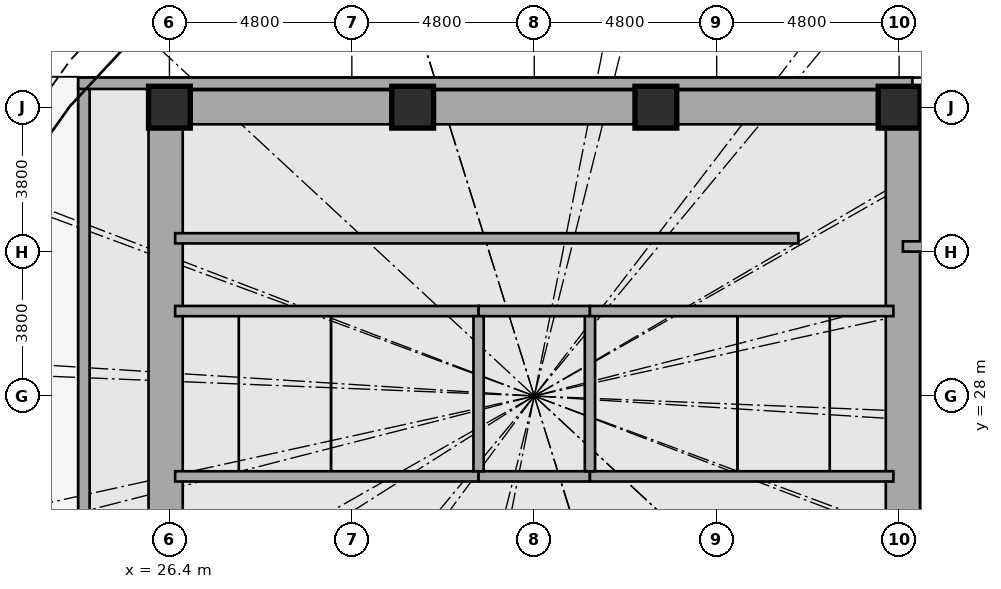
"""IFC4 building model, lengths in metres.
Left out: names, types, materials, properties, quantities, classifications, styles, units other than length and angle.
Written with IfcOpenShell. Run it as: python <this file> out.ifc"""

import sys

from ifc_helpers import new_model, si_unit, direction, frame, frame_2d, origin, origin_2d, place, context, subcontext, project, spatial, rectangle, extrude, element, fill, save


model = new_model("IFC4")
c1 = context("Model", 3, precision=1e-05, world=origin(), true_north=direction((0.0, 1.0)))
c2 = subcontext(c1, "Body", "Model", "MODEL_VIEW")
j1 = project(units=[si_unit("LENGTHUNIT", "METRE"), si_unit("PLANEANGLEUNIT", "RADIAN")], contexts=[c1])
p1 = place(None, origin())
s1 = spatial("IfcSite", under=j1, at=p1, CompositionType="ELEMENT")
p2 = place(p1, origin())
s2 = spatial("IfcBuilding", under=s1, at=p2, CompositionType="ELEMENT")
p3 = place(p2, origin())
s3 = spatial("IfcBuildingStorey", under=s2, at=p3, CompositionType="ELEMENT", Elevation=0.0)
for number, where, z_axis, x_axis in (
    (1, (45.6, 35.6, 0.0), (0.0, 0.0, 1.0), (1.0, 0.0, 0.0)),
    (2, (39.2, 35.6, 0.0), (0.0, 0.0, 1.0), (1.0, 0.0, 0.0)),
    (3, (32.8, 35.6, 0.0), (0.0, 0.0, 1.0), (1.0, 0.0, 0.0)),
    (4, (26.4, 35.6, 0.0), (0.0, 0.0, 1.0), (1.0, 0.0, 0.0)),
):
    element("IfcColumn", number, at=place(p3, frame(where, z_axis=z_axis, x_axis=x_axis)), inside=s3, PredefinedType="COLUMN", context=c2, shape_type="SweptSolid", body=[
        extrude(rectangle(XDim=1.1, YDim=1.1, at=origin_2d()), origin(), (0.0, 0.0, 1.0), 6.0),
    ])
p4 = place(p3, frame((26.3, 20.95, 0.0), z_axis=(0.0, 0.0, 1.0), x_axis=(0.0, 1.0, 0.0)))
e5 = element("IfcWall", 5, at=p4, inside=s3, PredefinedType="SHEAR", context=c2, shape_type="SweptSolid", body=[
    extrude(rectangle(XDim=14.1, YDim=0.9, at=frame_2d((7.05, 0.0))), origin(), (0.0, 0.0, 1.0), 6.0),
])
p5 = place(p4, frame((6.5, 0.0, 0.0)))
e6 = element("IfcOpeningElement", 6, at=p5, cuts=e5, PredefinedType="OPENING", context=c2, shape_type="SweptSolid", body=[
    extrude(rectangle(XDim=1.2, YDim=2.15, at=frame_2d((0.6, 1.075))), frame((0.0, 0.46, 0.0), z_axis=(0.0, -1.0, 0.0), x_axis=(1.0, 0.0, 0.0)), (0.0, 0.0, 1.0), 0.92),
])
p6 = place(p4, frame((9.6, 0.0, 0.0)))
e7 = element("IfcOpeningElement", 7, at=p6, cuts=e5, PredefinedType="OPENING", context=c2, shape_type="SweptSolid", body=[
    extrude(rectangle(XDim=1.3, YDim=2.2, at=frame_2d((0.65, 1.1))), frame((0.0, 0.46, 0.0), z_axis=(0.0, -1.0, 0.0), x_axis=(1.0, 0.0, 0.0)), (0.0, 0.0, 1.0), 0.92),
])
p7 = place(p4, frame((3.26, 0.0, 0.0)))
e8 = element("IfcOpeningElement", 8, at=p7, cuts=e5, PredefinedType="OPENING", context=c2, shape_type="SweptSolid", body=[
    extrude(rectangle(XDim=1.3, YDim=2.2, at=frame_2d((0.65, 1.1))), frame((0.0, 0.46, 0.0), z_axis=(0.0, -1.0, 0.0), x_axis=(1.0, 0.0, 0.0)), (0.0, 0.0, 1.0), 0.92),
])
p8 = place(p3, frame((45.7, 20.95, 0.0), z_axis=(0.0, 0.0, 1.0), x_axis=(0.0, 1.0, 0.0)))
e9 = element("IfcWall", 9, at=p8, inside=s3, PredefinedType="SHEAR", context=c2, shape_type="SweptSolid", body=[
    extrude(rectangle(XDim=14.1, YDim=0.9, at=frame_2d((7.05, 0.0))), origin(), (0.0, 0.0, 1.0), 6.0),
])
p9 = place(p8, frame((11.75, 0.0, 0.0)))
e10 = element("IfcOpeningElement", 10, at=p9, cuts=e9, PredefinedType="OPENING", context=c2, shape_type="SweptSolid", body=[
    extrude(rectangle(XDim=1.4, YDim=2.3, at=frame_2d((0.7, 1.15))), frame((0.0, 0.46, 0.0), z_axis=(0.0, -1.0, 0.0), x_axis=(1.0, 0.0, 0.0)), (0.0, 0.0, 1.0), 0.92),
])
p10 = place(p8, frame((0.95, 0.0, 0.0)))
e11 = element("IfcOpeningElement", 11, at=p10, cuts=e9, PredefinedType="OPENING", context=c2, shape_type="SweptSolid", body=[
    extrude(rectangle(XDim=1.4, YDim=2.3, at=frame_2d((0.7, 1.15))), frame((0.0, 0.46, 0.0), z_axis=(0.0, -1.0, 0.0), x_axis=(1.0, 0.0, 0.0)), (0.0, 0.0, 1.0), 0.92),
])
p11 = place(p3, frame((26.95, 35.6, 0.0), z_axis=(0.0, 0.0, 1.0), x_axis=(1.0, 0.0, 0.0)))
e12 = element("IfcWall", 12, at=p11, inside=s3, PredefinedType="SHEAR", context=c2, shape_type="SweptSolid", body=[
    extrude(rectangle(XDim=5.3, YDim=0.9, at=frame_2d((2.65, 0.0))), origin(), (0.0, 0.0, 1.0), 6.0),
])
p12 = place(p3, frame((33.35, 35.6, 0.0), z_axis=(0.0, 0.0, 1.0), x_axis=(1.0, 0.0, 0.0)))
e13 = element("IfcWall", 13, at=p12, inside=s3, PredefinedType="SHEAR", context=c2, shape_type="SweptSolid", body=[
    extrude(rectangle(XDim=5.3, YDim=0.9, at=frame_2d((2.65, 0.0))), origin(), (0.0, 0.0, 1.0), 6.0),
])
p13 = place(p3, frame((39.75, 35.6, 0.0), z_axis=(0.0, 0.0, 1.0), x_axis=(1.0, 0.0, 0.0)))
e14 = element("IfcWall", 14, at=p13, inside=s3, PredefinedType="SHEAR", context=c2, shape_type="SweptSolid", body=[
    extrude(rectangle(XDim=5.3, YDim=0.9, at=frame_2d((2.65, 0.0))), origin(), (0.0, 0.0, 1.0), 6.0),
])
p14 = place(p3, frame((24.15, 13.75, 0.0), z_axis=(0.0, 0.0, 1.0), x_axis=(0.0, 1.0, 0.0)))
e15 = element("IfcWall", 15, at=p14, inside=s3, PredefinedType="SOLIDWALL", context=c2, shape_type="SweptSolid", body=[
    extrude(rectangle(XDim=22.48, YDim=0.3, at=frame_2d((11.24, 0.0))), origin(), (0.0, 0.0, 1.0), 5.72),
])
p15 = place(p14, frame((8.15, 0.0, 0.0)))
e16 = element("IfcOpeningElement", 16, at=p15, cuts=e15, PredefinedType="OPENING", context=c2, shape_type="SweptSolid", body=[
    extrude(rectangle(XDim=1.8, YDim=2.4, at=frame_2d((0.9, 1.2))), frame((0.0, 0.16, 0.0), z_axis=(0.0, -1.0, 0.0), x_axis=(1.0, 0.0, 0.0)), (0.0, 0.0, 1.0), 0.32),
])
p16 = place(p14, frame((13.4, 0.0, 0.0)))
e17 = element("IfcOpeningElement", 17, at=p16, cuts=e15, PredefinedType="OPENING", context=c2, shape_type="SweptSolid", body=[
    extrude(rectangle(XDim=1.8, YDim=2.4, at=frame_2d((0.9, 1.2))), frame((0.0, 0.16, 0.0), z_axis=(0.0, -1.0, 0.0), x_axis=(1.0, 0.0, 0.0)), (0.0, 0.0, 1.0), 0.32),
])
p17 = place(p14, frame((18.45, 0.0, 0.0)))
e18 = element("IfcOpeningElement", 18, at=p17, cuts=e15, PredefinedType="OPENING", context=c2, shape_type="SweptSolid", body=[
    extrude(rectangle(XDim=1.8, YDim=2.4, at=frame_2d((0.9, 1.2))), frame((0.0, 0.16, 0.0), z_axis=(0.0, -1.0, 0.0), x_axis=(1.0, 0.0, 0.0)), (0.0, 0.0, 1.0), 0.32),
])
p18 = place(p3, frame((24.0, 36.23, 0.0), z_axis=(0.0, 0.0, 1.0), x_axis=(1.0, 0.0, 0.0)))
e19 = element("IfcWall", 19, at=p18, inside=s3, PredefinedType="SOLIDWALL", context=c2, shape_type="SweptSolid", body=[
    extrude(rectangle(XDim=21.95, YDim=0.3, at=frame_2d((10.975, 0.0))), origin(), (0.0, 0.0, 1.0), 5.72),
])
p19 = place(p18, frame((4.45, 0.0, 0.9)))
e20 = element("IfcOpeningElement", 20, at=p19, cuts=e19, PredefinedType="OPENING", context=c2, shape_type="SweptSolid", body=[
    extrude(rectangle(XDim=2.4, YDim=3.0, at=frame_2d((1.2, 1.5))), frame((0.0, 0.16, 0.0), z_axis=(0.0, -1.0, 0.0), x_axis=(1.0, 0.0, 0.0)), (0.0, 0.0, 1.0), 0.32),
])
p20 = place(p18, frame((10.85, 0.0, 0.9)))
e21 = element("IfcOpeningElement", 21, at=p20, cuts=e19, PredefinedType="OPENING", context=c2, shape_type="SweptSolid", body=[
    extrude(rectangle(XDim=2.4, YDim=3.0, at=frame_2d((1.2, 1.5))), frame((0.0, 0.16, 0.0), z_axis=(0.0, -1.0, 0.0), x_axis=(1.0, 0.0, 0.0)), (0.0, 0.0, 1.0), 0.32),
])
p21 = place(p18, frame((17.25, 0.0, 0.9)))
e22 = element("IfcOpeningElement", 22, at=p21, cuts=e19, PredefinedType="OPENING", context=c2, shape_type="SweptSolid", body=[
    extrude(rectangle(XDim=2.4, YDim=3.0, at=frame_2d((1.2, 1.5))), frame((0.0, 0.16, 0.0), z_axis=(0.0, -1.0, 0.0), x_axis=(1.0, 0.0, 0.0)), (0.0, 0.0, 1.0), 0.32),
])
p22 = place(p3, frame((26.55, 30.235, 0.0), z_axis=(0.0, 0.0, 1.0), x_axis=(1.0, 0.0, 0.0)))
e23 = element("IfcWall", 23, at=p22, inside=s3, PredefinedType="SHEAR", context=c2, shape_type="SweptSolid", body=[
    extrude(rectangle(XDim=7.985, YDim=0.27, at=frame_2d((3.992, 0.0))), origin(), (0.0, 0.0, 1.0), 6.0),
])
p23 = place(p3, frame((34.535, 30.235, 0.0), z_axis=(0.0, 0.0, 1.0), x_axis=(1.0, 0.0, 0.0)))
e24 = element("IfcWall", 24, at=p23, inside=s3, PredefinedType="SHEAR", context=c2, shape_type="SweptSolid", body=[
    extrude(rectangle(XDim=2.93, YDim=0.27, at=frame_2d((1.465, 0.0))), origin(), (0.0, 0.0, 1.0), 6.0),
])
p24 = place(p23, frame((0.965, 0.0, 0.0)))
e25 = element("IfcOpeningElement", 25, at=p24, cuts=e24, PredefinedType="OPENING", context=c2, shape_type="SweptSolid", body=[
    extrude(rectangle(XDim=1.0, YDim=2.1, at=frame_2d((0.5, 1.05))), frame((0.0, 0.145, 0.0), z_axis=(0.0, -1.0, 0.0), x_axis=(1.0, 0.0, 0.0)), (0.0, 0.0, 1.0), 0.29),
])
p25 = place(p3, frame((37.465, 30.235, 0.0), z_axis=(0.0, 0.0, 1.0), x_axis=(1.0, 0.0, 0.0)))
e26 = element("IfcWall", 26, at=p25, inside=s3, PredefinedType="SHEAR", context=c2, shape_type="SweptSolid", body=[
    extrude(rectangle(XDim=7.985, YDim=0.27, at=frame_2d((3.992, 0.0))), origin(), (0.0, 0.0, 1.0), 6.0),
])
p26 = place(p25, frame((6.455, 0.0, 0.0)))
e27 = element("IfcOpeningElement", 27, at=p26, cuts=e26, PredefinedType="OPENING", context=c2, shape_type="SweptSolid", body=[
    extrude(rectangle(XDim=1.2, YDim=2.15, at=frame_2d((0.6, 1.075))), frame((0.0, 0.145, 0.0), z_axis=(0.0, -1.0, 0.0), x_axis=(1.0, 0.0, 0.0)), (0.0, 0.0, 1.0), 0.29),
])
p27 = place(p3, frame((26.55, 25.885, 0.0), z_axis=(0.0, 0.0, 1.0), x_axis=(1.0, 0.0, 0.0)))
e28 = element("IfcWall", 28, at=p27, inside=s3, PredefinedType="SHEAR", context=c2, shape_type="SweptSolid", body=[
    extrude(rectangle(XDim=7.985, YDim=0.27, at=frame_2d((3.992, 0.0))), origin(), (0.0, 0.0, 1.0), 6.0),
])
p28 = place(p3, frame((34.535, 25.885, 0.0), z_axis=(0.0, 0.0, 1.0), x_axis=(1.0, 0.0, 0.0)))
e29 = element("IfcWall", 29, at=p28, inside=s3, PredefinedType="SHEAR", context=c2, shape_type="SweptSolid", body=[
    extrude(rectangle(XDim=2.93, YDim=0.27, at=frame_2d((1.465, 0.0))), origin(), (0.0, 0.0, 1.0), 6.0),
])
p29 = place(p3, frame((37.465, 25.885, 0.0), z_axis=(0.0, 0.0, 1.0), x_axis=(1.0, 0.0, 0.0)))
e30 = element("IfcWall", 30, at=p29, inside=s3, PredefinedType="SHEAR", context=c2, shape_type="SweptSolid", body=[
    extrude(rectangle(XDim=7.985, YDim=0.27, at=frame_2d((3.992, 0.0))), origin(), (0.0, 0.0, 1.0), 6.0),
])
for number, where, z_axis, x_axis in (
    (31, (34.535, 26.02, 0.0), (0.0, 0.0, 1.0), (0.0, 1.0, 0.0)),
    (32, (37.465, 26.02, 0.0), (0.0, 0.0, 1.0), (0.0, 1.0, 0.0)),
):
    element("IfcWall", number, at=place(p3, frame(where, z_axis=z_axis, x_axis=x_axis)), inside=s3, PredefinedType="SHEAR", context=c2, shape_type="SweptSolid", body=[
        extrude(rectangle(XDim=4.08, YDim=0.27, at=frame_2d((2.04, 0.0))), origin(), (0.0, 0.0, 1.0), 6.0),
    ])
p30 = place(p3, frame((26.55, 32.15, 0.0), z_axis=(0.0, 0.0, 1.0), x_axis=(1.0, 0.0, 0.0)))
e33 = element("IfcWall", 33, at=p30, inside=s3, PredefinedType="SHEAR", context=c2, shape_type="SweptSolid", body=[
    extrude(rectangle(XDim=16.4, YDim=0.27, at=frame_2d((8.2, 0.0))), origin(), (0.0, 0.0, 1.0), 6.0),
])
p31 = place(p30, frame((1.1, 0.0, 0.0)))
e34 = element("IfcOpeningElement", 34, at=p31, cuts=e33, PredefinedType="OPENING", context=c2, shape_type="SweptSolid", body=[
    extrude(rectangle(XDim=1.1, YDim=2.2, at=frame_2d((0.55, 1.1))), frame((0.0, 0.145, 0.0), z_axis=(0.0, -1.0, 0.0), x_axis=(1.0, 0.0, 0.0)), (0.0, 0.0, 1.0), 0.29),
])
p32 = place(p30, frame((3.7, 0.0, 0.0)))
e35 = element("IfcOpeningElement", 35, at=p32, cuts=e33, PredefinedType="OPENING", context=c2, shape_type="SweptSolid", body=[
    extrude(rectangle(XDim=1.1, YDim=2.2, at=frame_2d((0.55, 1.1))), frame((0.0, 0.145, 0.0), z_axis=(0.0, -1.0, 0.0), x_axis=(1.0, 0.0, 0.0)), (0.0, 0.0, 1.0), 0.29),
])
p33 = place(p30, frame((6.5, 0.0, 0.0)))
e36 = element("IfcOpeningElement", 36, at=p33, cuts=e33, PredefinedType="OPENING", context=c2, shape_type="SweptSolid", body=[
    extrude(rectangle(XDim=1.1, YDim=2.2, at=frame_2d((0.55, 1.1))), frame((0.0, 0.145, 0.0), z_axis=(0.0, -1.0, 0.0), x_axis=(1.0, 0.0, 0.0)), (0.0, 0.0, 1.0), 0.29),
])
p34 = place(p30, frame((9.1, 0.0, 0.0)))
e37 = element("IfcOpeningElement", 37, at=p34, cuts=e33, PredefinedType="OPENING", context=c2, shape_type="SweptSolid", body=[
    extrude(rectangle(XDim=1.1, YDim=2.2, at=frame_2d((0.55, 1.1))), frame((0.0, 0.145, 0.0), z_axis=(0.0, -1.0, 0.0), x_axis=(1.0, 0.0, 0.0)), (0.0, 0.0, 1.0), 0.29),
])
p35 = place(p30, frame((11.9, 0.0, 0.0)))
e38 = element("IfcOpeningElement", 38, at=p35, cuts=e33, PredefinedType="OPENING", context=c2, shape_type="SweptSolid", body=[
    extrude(rectangle(XDim=1.1, YDim=2.2, at=frame_2d((0.55, 1.1))), frame((0.0, 0.145, 0.0), z_axis=(0.0, -1.0, 0.0), x_axis=(1.0, 0.0, 0.0)), (0.0, 0.0, 1.0), 0.29),
])
p36 = place(p30, frame((14.5, 0.0, 0.0)))
e39 = element("IfcOpeningElement", 39, at=p36, cuts=e33, PredefinedType="OPENING", context=c2, shape_type="SweptSolid", body=[
    extrude(rectangle(XDim=1.1, YDim=2.2, at=frame_2d((0.55, 1.1))), frame((0.0, 0.145, 0.0), z_axis=(0.0, -1.0, 0.0), x_axis=(1.0, 0.0, 0.0)), (0.0, 0.0, 1.0), 0.29),
])
p37 = place(p3, frame((42.95, 31.92, 0.0), z_axis=(0.0, 0.0, 1.0), x_axis=(0.0, 1.0, 0.0)))
e40 = element("IfcWall", 40, at=p37, inside=s3, PredefinedType="SOLIDWALL", context=c2, shape_type="SweptSolid", body=[
    extrude(rectangle(XDim=3.18, YDim=0.25, at=frame_2d((1.59, 0.0))), origin(), (0.0, 0.0, 1.0), 5.72),
])
p38 = place(p3, frame((42.95, 31.92, 0.0), z_axis=(0.0, 0.0, 1.0), x_axis=(1.0, 0.0, 0.0)))
e41 = element("IfcWall", 41, at=p38, inside=s3, PredefinedType="SOLIDWALL", context=c2, shape_type="SweptSolid", body=[
    extrude(rectangle(XDim=2.3, YDim=0.25, at=frame_2d((1.15, 0.0))), origin(), (0.0, 0.0, 1.0), 5.72),
])
for number, where, z_axis, x_axis in (
    (42, (29.5, 32.42, 0.0), (0.0, 0.0, 1.0), (0.0, 1.0, 0.0)),
    (43, (32.2, 32.42, 0.0), (0.0, 0.0, 1.0), (0.0, 1.0, 0.0)),
    (44, (34.9, 32.42, 0.0), (0.0, 0.0, 1.0), (0.0, 1.0, 0.0)),
    (45, (37.6, 32.42, 0.0), (0.0, 0.0, 1.0), (0.0, 1.0, 0.0)),
    (46, (40.3, 32.42, 0.0), (0.0, 0.0, 1.0), (0.0, 1.0, 0.0)),
):
    element("IfcWall", number, at=place(p3, frame(where, z_axis=z_axis, x_axis=x_axis)), inside=s3, PredefinedType="SOLIDWALL", context=c2, shape_type="SweptSolid", body=[
        extrude(rectangle(XDim=2.68, YDim=0.25, at=frame_2d((1.34, 0.0))), origin(), (0.0, 0.0, 1.0), 5.72),
    ])
p39 = place(p3, frame((46.15, 35.98, 0.0), z_axis=(0.0, 0.0, 1.0), x_axis=(1.0, 0.0, 0.0)))
e47 = element("IfcWall", 47, at=p39, inside=s3, PredefinedType="SHEAR", context=c2, shape_type="SweptSolid", body=[
    extrude(rectangle(XDim=4.4, YDim=0.27, at=frame_2d((2.2, 0.0))), origin(), (0.0, 0.0, 1.0), 6.0),
])
p40 = place(p3, frame((45.7, 31.935, 0.0), z_axis=(0.0, 0.0, 1.0), x_axis=(1.0, 0.0, 0.0)))
e48 = element("IfcWall", 48, at=p40, inside=s3, PredefinedType="SHEAR", context=c2, shape_type="SweptSolid", body=[
    extrude(rectangle(XDim=4.715, YDim=0.27, at=frame_2d((2.357, 0.0))), origin(), (0.0, 0.0, 1.0), 6.0),
])
for number, where, z_axis, x_axis in (
    (49, (24.15, 30.225, 0.0), (0.0, 0.0, 1.0), (1.0, 0.0, 0.0)),
    (50, (24.15, 25.895, 0.0), (0.0, 0.0, 1.0), (1.0, 0.0, 0.0)),
):
    element("IfcWall", number, at=place(p3, frame(where, z_axis=z_axis, x_axis=x_axis)), inside=s3, PredefinedType="SOLIDWALL", context=c2, shape_type="SweptSolid", body=[
        extrude(rectangle(XDim=2.15, YDim=0.25, at=frame_2d((1.075, 0.0))), origin(), (0.0, 0.0, 1.0), 5.72),
    ])
p41 = place(p16, origin())
e51 = element("IfcDoor", 51, at=p41, inside=s3, OperationType="DOUBLE_DOOR_SINGLE_SWING", PredefinedType="DOOR", context=c2, shape_type="SweptSolid", body=[
    extrude(rectangle(XDim=1.8, YDim=2.4, at=frame_2d((0.9, 1.2))), frame((0.0, 0.025, 0.0), z_axis=(0.0, -1.0, 0.0), x_axis=(1.0, 0.0, 0.0)), (0.0, 0.0, 1.0), 0.05),
])
fill(e17, e51)
p42 = place(p17, origin())
e52 = element("IfcDoor", 52, at=p42, inside=s3, OperationType="DOUBLE_DOOR_SINGLE_SWING", PredefinedType="DOOR", context=c2, shape_type="SweptSolid", body=[
    extrude(rectangle(XDim=1.8, YDim=2.4, at=frame_2d((0.9, 1.2))), frame((0.0, 0.025, 0.0), z_axis=(0.0, -1.0, 0.0), x_axis=(1.0, 0.0, 0.0)), (0.0, 0.0, 1.0), 0.05),
])
fill(e18, e52)
p43 = place(p19, origin())
e53 = element("IfcWindow", 53, at=p43, inside=s3, PartitioningType="SINGLE_PANEL", PredefinedType="WINDOW", context=c2, shape_type="SweptSolid", body=[
    extrude(rectangle(XDim=2.4, YDim=3.0, at=frame_2d((1.2, 1.5))), frame((0.0, 0.03, 0.0), z_axis=(0.0, -1.0, 0.0), x_axis=(1.0, 0.0, 0.0)), (0.0, 0.0, 1.0), 0.06),
])
fill(e20, e53)
p44 = place(p20, origin())
e54 = element("IfcWindow", 54, at=p44, inside=s3, PartitioningType="SINGLE_PANEL", PredefinedType="WINDOW", context=c2, shape_type="SweptSolid", body=[
    extrude(rectangle(XDim=2.4, YDim=3.0, at=frame_2d((1.2, 1.5))), frame((0.0, 0.03, 0.0), z_axis=(0.0, -1.0, 0.0), x_axis=(1.0, 0.0, 0.0)), (0.0, 0.0, 1.0), 0.06),
])
fill(e21, e54)
p45 = place(p21, origin())
e55 = element("IfcWindow", 55, at=p45, inside=s3, PartitioningType="SINGLE_PANEL", PredefinedType="WINDOW", context=c2, shape_type="SweptSolid", body=[
    extrude(rectangle(XDim=2.4, YDim=3.0, at=frame_2d((1.2, 1.5))), frame((0.0, 0.03, 0.0), z_axis=(0.0, -1.0, 0.0), x_axis=(1.0, 0.0, 0.0)), (0.0, 0.0, 1.0), 0.06),
])
fill(e22, e55)
p46 = place(p5, origin())
e56 = element("IfcDoor", 56, at=p46, inside=s3, OperationType="SINGLE_SWING_LEFT", PredefinedType="DOOR", context=c2, shape_type="SweptSolid", body=[
    extrude(rectangle(XDim=1.2, YDim=2.15, at=frame_2d((0.6, 1.075))), frame((0.0, 0.025, 0.0), z_axis=(0.0, -1.0, 0.0), x_axis=(1.0, 0.0, 0.0)), (0.0, 0.0, 1.0), 0.05),
])
fill(e6, e56)
p47 = place(p26, origin())
e57 = element("IfcDoor", 57, at=p47, inside=s3, OperationType="SINGLE_SWING_RIGHT", PredefinedType="DOOR", context=c2, shape_type="SweptSolid", body=[
    extrude(rectangle(XDim=1.2, YDim=2.15, at=frame_2d((0.6, 1.075))), frame((0.0, 0.025, 0.0), z_axis=(0.0, -1.0, 0.0), x_axis=(1.0, 0.0, 0.0)), (0.0, 0.0, 1.0), 0.05),
])
fill(e27, e57)
p48 = place(p24, origin())
e58 = element("IfcDoor", 58, at=p48, inside=s3, OperationType="SINGLE_SWING_RIGHT", PredefinedType="DOOR", context=c2, shape_type="SweptSolid", body=[
    extrude(rectangle(XDim=1.0, YDim=2.1, at=frame_2d((0.5, 1.05))), frame((0.0, 0.025, 0.0), z_axis=(0.0, -1.0, 0.0), x_axis=(1.0, 0.0, 0.0)), (0.0, 0.0, 1.0), 0.05),
])
fill(e25, e58)
p49 = place(p6, origin())
e59 = element("IfcDoor", 59, at=p49, inside=s3, OperationType="SINGLE_SWING_LEFT", PredefinedType="DOOR", context=c2, shape_type="SweptSolid", body=[
    extrude(rectangle(XDim=1.3, YDim=2.2, at=frame_2d((0.65, 1.1))), frame((0.0, 0.025, 0.0), z_axis=(0.0, -1.0, 0.0), x_axis=(1.0, 0.0, 0.0)), (0.0, 0.0, 1.0), 0.05),
])
fill(e7, e59)
p50 = place(p7, origin())
e60 = element("IfcDoor", 60, at=p50, inside=s3, OperationType="SINGLE_SWING_RIGHT", PredefinedType="DOOR", context=c2, shape_type="SweptSolid", body=[
    extrude(rectangle(XDim=1.3, YDim=2.2, at=frame_2d((0.65, 1.1))), frame((0.0, 0.025, 0.0), z_axis=(0.0, -1.0, 0.0), x_axis=(1.0, 0.0, 0.0)), (0.0, 0.0, 1.0), 0.05),
])
fill(e8, e60)
p51 = place(p31, origin())
e61 = element("IfcDoor", 61, at=p51, inside=s3, OperationType="SLIDING_TO_LEFT", PredefinedType="DOOR", context=c2, shape_type="SweptSolid", body=[
    extrude(rectangle(XDim=1.1, YDim=2.2, at=frame_2d((0.55, 1.1))), frame((0.0, 0.025, 0.0), z_axis=(0.0, -1.0, 0.0), x_axis=(1.0, 0.0, 0.0)), (0.0, 0.0, 1.0), 0.05),
])
fill(e34, e61)
p52 = place(p32, origin())
e62 = element("IfcDoor", 62, at=p52, inside=s3, OperationType="SLIDING_TO_LEFT", PredefinedType="DOOR", context=c2, shape_type="SweptSolid", body=[
    extrude(rectangle(XDim=1.1, YDim=2.2, at=frame_2d((0.55, 1.1))), frame((0.0, 0.025, 0.0), z_axis=(0.0, -1.0, 0.0), x_axis=(1.0, 0.0, 0.0)), (0.0, 0.0, 1.0), 0.05),
])
fill(e35, e62)
p53 = place(p33, origin())
e63 = element("IfcDoor", 63, at=p53, inside=s3, OperationType="SLIDING_TO_LEFT", PredefinedType="DOOR", context=c2, shape_type="SweptSolid", body=[
    extrude(rectangle(XDim=1.1, YDim=2.2, at=frame_2d((0.55, 1.1))), frame((0.0, 0.025, 0.0), z_axis=(0.0, -1.0, 0.0), x_axis=(1.0, 0.0, 0.0)), (0.0, 0.0, 1.0), 0.05),
])
fill(e36, e63)
p54 = place(p34, origin())
e64 = element("IfcDoor", 64, at=p54, inside=s3, OperationType="SLIDING_TO_LEFT", PredefinedType="DOOR", context=c2, shape_type="SweptSolid", body=[
    extrude(rectangle(XDim=1.1, YDim=2.2, at=frame_2d((0.55, 1.1))), frame((0.0, 0.025, 0.0), z_axis=(0.0, -1.0, 0.0), x_axis=(1.0, 0.0, 0.0)), (0.0, 0.0, 1.0), 0.05),
])
fill(e37, e64)
p55 = place(p35, origin())
e65 = element("IfcDoor", 65, at=p55, inside=s3, OperationType="SLIDING_TO_LEFT", PredefinedType="DOOR", context=c2, shape_type="SweptSolid", body=[
    extrude(rectangle(XDim=1.1, YDim=2.2, at=frame_2d((0.55, 1.1))), frame((0.0, 0.025, 0.0), z_axis=(0.0, -1.0, 0.0), x_axis=(1.0, 0.0, 0.0)), (0.0, 0.0, 1.0), 0.05),
])
fill(e38, e65)
p56 = place(p36, origin())
e66 = element("IfcDoor", 66, at=p56, inside=s3, OperationType="SLIDING_TO_LEFT", PredefinedType="DOOR", context=c2, shape_type="SweptSolid", body=[
    extrude(rectangle(XDim=1.1, YDim=2.2, at=frame_2d((0.55, 1.1))), frame((0.0, 0.025, 0.0), z_axis=(0.0, -1.0, 0.0), x_axis=(1.0, 0.0, 0.0)), (0.0, 0.0, 1.0), 0.05),
])
fill(e39, e66)
p57 = place(p9, origin())
e67 = element("IfcDoor", 67, at=p57, inside=s3, OperationType="SLIDING_TO_LEFT", PredefinedType="DOOR", context=c2, shape_type="SweptSolid", body=[
    extrude(rectangle(XDim=1.4, YDim=2.3, at=frame_2d((0.7, 1.15))), frame((0.0, 0.025, 0.0), z_axis=(0.0, -1.0, 0.0), x_axis=(1.0, 0.0, 0.0)), (0.0, 0.0, 1.0), 0.05),
])
fill(e10, e67)
save(model, sys.argv[1])
